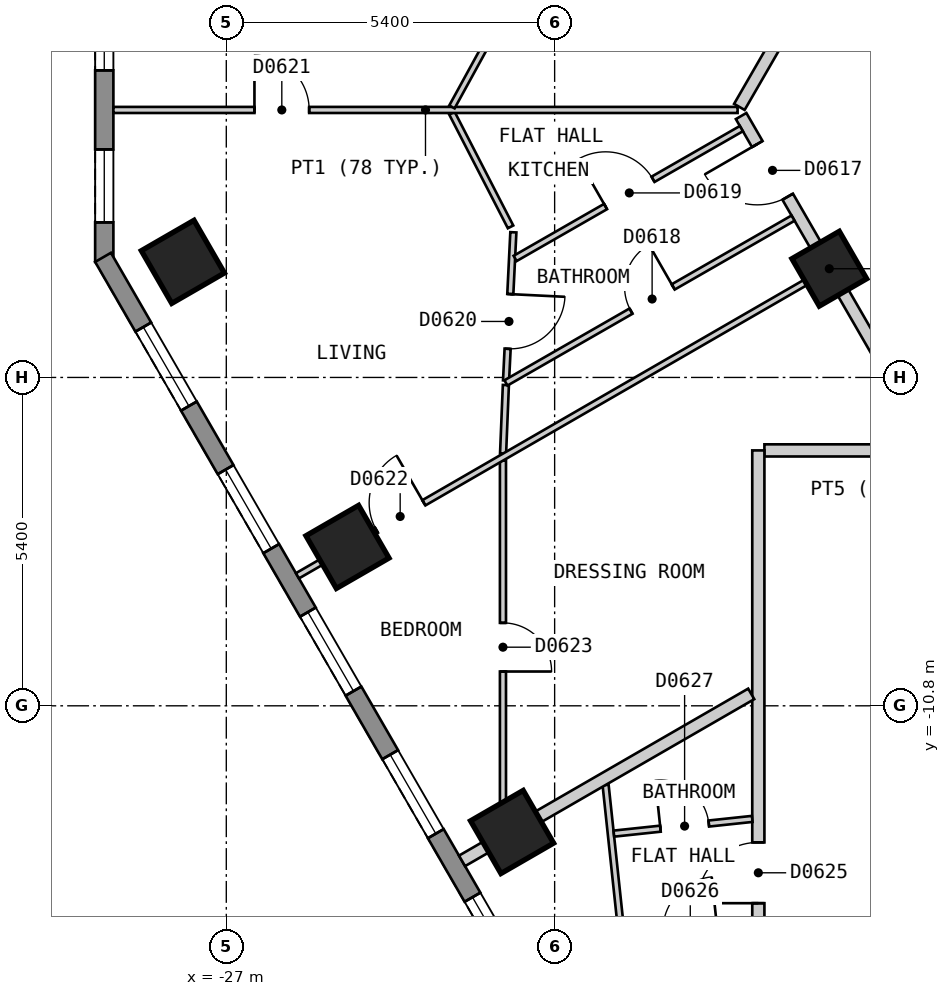
"""IFC4 building model, lengths in metres.
Left out: names, types, materials, properties, quantities, classifications, styles, units other than length and angle.
Written with IfcOpenShell. Run it as: python <this file> out.ifc"""

import sys

from ifc_helpers import new_model, si_unit, direction, frame, frame_2d, origin, origin_2d, place, context, subcontext, project, spatial, polyline, rectangle, outline, extrude, element, fill, save


model = new_model("IFC4")
c1 = context("Model", 3, precision=1e-05, world=origin(), true_north=direction((0.0, 1.0)))
c2 = subcontext(c1, "Body", "Model", "MODEL_VIEW")
j1 = project(units=[si_unit("LENGTHUNIT", "METRE"), si_unit("PLANEANGLEUNIT", "RADIAN")], contexts=[c1])
p1 = place(None, origin())
s1 = spatial("IfcSite", under=j1, at=p1, CompositionType="ELEMENT")
p2 = place(p1, origin())
s2 = spatial("IfcBuilding", under=s1, at=p2, CompositionType="ELEMENT")
p3 = place(p2, frame((0.0, 0.0, 81.0)))
s3 = spatial("IfcBuildingStorey", under=s2, at=p3, CompositionType="ELEMENT", Elevation=81.0)
for number, where, z_axis, x_axis in (
    (1, (-27.714, -3.499, 0.0), (0.0, 0.0, 1.0), (0.5, -0.866, 0.0)),
    (2, (-25.007, -8.187, 0.0), (0.0, 0.0, 1.0), (0.5, -0.866, 0.0)),
    (3, (-22.3, -12.875, 0.0), (0.0, 0.0, 1.0), (0.5, -0.866, 0.0)),
):
    element("IfcColumn", number, at=place(p3, frame(where, z_axis=z_axis, x_axis=x_axis)), inside=s3, PredefinedType="COLUMN", context=c2, shape_type="SweptSolid", body=[
        extrude(rectangle(XDim=1.0, YDim=1.0, at=origin_2d()), origin(), (0.0, 0.0, 1.0), 3.0),
    ])
p4 = place(p3, frame((-17.083, -3.612, 0.0), z_axis=(0.0, 0.0, 1.0), x_axis=(0.5, -0.866025403784, 0.0)))
e4 = element("IfcColumn", 4, at=p4, inside=s3, PredefinedType="COLUMN", context=c2, shape_type="SweptSolid", body=[
    extrude(rectangle(XDim=0.9, YDim=0.9, at=origin_2d()), origin(), (0.0, 0.0, 1.0), 3.0),
])
p5 = place(p3, frame((-29.007, 1.5, 0.0), z_axis=(0.0, 0.0, 1.0), x_axis=(0.0, -1.0, 0.0)))
e5 = element("IfcWall", 5, at=p5, inside=s3, PredefinedType="SOLIDWALL", context=c2, shape_type="SweptSolid", body=[
    extrude(outline(polyline([(0.0, -0.15), (5.0, -0.15), (4.92, 0.15), (0.08, 0.15), (0.0, -0.15)])), origin(), (0.0, 0.0, 1.0), 2.7),
])
p6 = place(p5, frame((0.65, 0.0, 0.15)))
e6 = element("IfcOpeningElement", 6, at=p6, cuts=e5, PredefinedType="OPENING", context=c2, shape_type="SweptSolid", body=[
    extrude(rectangle(XDim=1.2, YDim=2.1, at=frame_2d((0.6, 1.05))), frame((0.0, 0.16, 0.0), z_axis=(0.0, -1.0, 0.0), x_axis=(1.0, 0.0, 0.0)), (0.0, 0.0, 1.0), 0.32),
])
p7 = place(p5, frame((3.15, 0.0, 0.15)))
e7 = element("IfcOpeningElement", 7, at=p7, cuts=e5, PredefinedType="OPENING", context=c2, shape_type="SweptSolid", body=[
    extrude(rectangle(XDim=1.2, YDim=2.1, at=frame_2d((0.6, 1.05))), frame((0.0, 0.16, 0.0), z_axis=(0.0, -1.0, 0.0), x_axis=(1.0, 0.0, 0.0)), (0.0, 0.0, 1.0), 0.32),
])
p8 = place(p3, frame((-29.027, -3.425, 0.0), z_axis=(0.0, 0.0, 1.0), x_axis=(0.500035407905, -0.866004960056, 0.0)))
e8 = element("IfcWall", 8, at=p8, inside=s3, PredefinedType="SOLIDWALL", context=c2, shape_type="SweptSolid", body=[
    extrude(outline(polyline([(0.0, -0.15), (23.094, -0.15), (23.014, 0.15), (0.08, 0.15), (0.0, -0.15)])), origin(), (0.0, 0.0, 1.0), 2.7),
])
p9 = place(p8, frame((1.324, 0.0, 0.15)))
e9 = element("IfcOpeningElement", 9, at=p9, cuts=e8, PredefinedType="OPENING", context=c2, shape_type="SweptSolid", body=[
    extrude(rectangle(XDim=1.5, YDim=2.1, at=frame_2d((0.75, 1.05))), frame((0.0, 0.16, 0.0), z_axis=(0.0, -1.0, 0.0), x_axis=(1.0, 0.0, 0.0)), (0.0, 0.0, 1.0), 0.32),
])
p10 = place(p8, frame((4.031, 0.0, 0.15)))
e10 = element("IfcOpeningElement", 10, at=p10, cuts=e8, PredefinedType="OPENING", context=c2, shape_type="SweptSolid", body=[
    extrude(rectangle(XDim=1.5, YDim=2.1, at=frame_2d((0.75, 1.05))), frame((0.0, 0.16, 0.0), z_axis=(0.0, -1.0, 0.0), x_axis=(1.0, 0.0, 0.0)), (0.0, 0.0, 1.0), 0.32),
])
p11 = place(p8, frame((6.737, 0.0, 0.15)))
e11 = element("IfcOpeningElement", 11, at=p11, cuts=e8, PredefinedType="OPENING", context=c2, shape_type="SweptSolid", body=[
    extrude(rectangle(XDim=1.5, YDim=2.1, at=frame_2d((0.75, 1.05))), frame((0.0, 0.16, 0.0), z_axis=(0.0, -1.0, 0.0), x_axis=(1.0, 0.0, 0.0)), (0.0, 0.0, 1.0), 0.32),
])
p12 = place(p8, frame((9.444, 0.0, 0.15)))
e12 = element("IfcOpeningElement", 12, at=p12, cuts=e8, PredefinedType="OPENING", context=c2, shape_type="SweptSolid", body=[
    extrude(rectangle(XDim=1.5, YDim=2.1, at=frame_2d((0.75, 1.05))), frame((0.0, 0.16, 0.0), z_axis=(0.0, -1.0, 0.0), x_axis=(1.0, 0.0, 0.0)), (0.0, 0.0, 1.0), 0.32),
])
p13 = place(p8, frame((12.151, 0.0, 0.15)))
e13 = element("IfcOpeningElement", 13, at=p13, cuts=e8, PredefinedType="OPENING", context=c2, shape_type="SweptSolid", body=[
    extrude(rectangle(XDim=1.5, YDim=2.1, at=frame_2d((0.75, 1.05))), frame((0.0, 0.16, 0.0), z_axis=(0.0, -1.0, 0.0), x_axis=(1.0, 0.0, 0.0)), (0.0, 0.0, 1.0), 0.32),
])
p14 = place(p8, frame((14.857, 0.0, 0.15)))
e14 = element("IfcOpeningElement", 14, at=p14, cuts=e8, PredefinedType="OPENING", context=c2, shape_type="SweptSolid", body=[
    extrude(rectangle(XDim=1.5, YDim=2.1, at=frame_2d((0.75, 1.05))), frame((0.0, 0.16, 0.0), z_axis=(0.0, -1.0, 0.0), x_axis=(1.0, 0.0, 0.0)), (0.0, 0.0, 1.0), 0.32),
])
p15 = place(p8, frame((17.564, 0.0, 0.15)))
e15 = element("IfcOpeningElement", 15, at=p15, cuts=e8, PredefinedType="OPENING", context=c2, shape_type="SweptSolid", body=[
    extrude(rectangle(XDim=1.5, YDim=2.1, at=frame_2d((0.75, 1.05))), frame((0.0, 0.16, 0.0), z_axis=(0.0, -1.0, 0.0), x_axis=(1.0, 0.0, 0.0)), (0.0, 0.0, 1.0), 0.32),
])
p16 = place(p8, frame((20.27, 0.0, 0.15)))
e16 = element("IfcOpeningElement", 16, at=p16, cuts=e8, PredefinedType="OPENING", context=c2, shape_type="SweptSolid", body=[
    extrude(rectangle(XDim=1.5, YDim=2.1, at=frame_2d((0.75, 1.05))), frame((0.0, 0.16, 0.0), z_axis=(0.0, -1.0, 0.0), x_axis=(1.0, 0.0, 0.0)), (0.0, 0.0, 1.0), 0.32),
])
p17 = place(p3, frame((-18.533, -1.101, 0.0), z_axis=(0.0, 0.0, 1.0), x_axis=(0.500022085096, -0.866012652573, 0.0)))
e17 = element("IfcWall", 17, at=p17, inside=s3, PredefinedType="PARTITIONING", context=c2, shape_type="SweptSolid", body=[
    extrude(rectangle(XDim=6.066, YDim=0.2, at=frame_2d((3.033, 0.0))), origin(), (0.0, 0.0, 1.0), 2.7),
])
p18 = place(p17, frame((0.532, 0.0, 0.0)))
e18 = element("IfcOpeningElement", 18, at=p18, cuts=e17, PredefinedType="OPENING", context=c2, shape_type="SweptSolid", body=[
    extrude(rectangle(XDim=1.0, YDim=2.1, at=frame_2d((0.5, 1.05))), frame((0.0, 0.11, 0.0), z_axis=(0.0, -1.0, 0.0), x_axis=(1.0, 0.0, 0.0)), (0.0, 0.0, 1.0), 0.22),
])
p19 = place(p3, frame((-18.15, -6.6, 0.0), z_axis=(0.0, 0.0, 1.0), x_axis=(1.0, 0.0, 0.0)))
e19 = element("IfcWall", 19, at=p19, inside=s3, PredefinedType="PARTITIONING", context=c2, shape_type="SweptSolid", body=[
    extrude(rectangle(XDim=2.649, YDim=0.2, at=frame_2d((1.324, 0.0))), origin(), (0.0, 0.0, 1.0), 2.7),
])
p20 = place(p3, frame((-18.562, -0.951, 0.0), z_axis=(0.0, 0.0, 1.0), x_axis=(0.499992962407, 0.866029466902, 0.0)))
e20 = element("IfcWall", 20, at=p20, inside=s3, PredefinedType="PARTITIONING", context=c2, shape_type="SweptSolid", body=[
    extrude(rectangle(XDim=20.208, YDim=0.2, at=frame_2d((10.104, 0.0))), origin(), (0.0, 0.0, 1.0), 2.7),
])
p21 = place(p20, frame((9.604, 0.0, 0.0)))
e21 = element("IfcOpeningElement", 21, at=p21, cuts=e20, PredefinedType="OPENING", context=c2, shape_type="SweptSolid", body=[
    extrude(rectangle(XDim=1.0, YDim=2.1, at=frame_2d((0.5, 1.05))), frame((0.0, 0.11, 0.0), z_axis=(0.0, -1.0, 0.0), x_axis=(1.0, 0.0, 0.0)), (0.0, 0.0, 1.0), 0.22),
])
p22 = place(p3, frame((-18.25, -14.386, 0.0), z_axis=(0.0, 0.0, 1.0), x_axis=(0.0, 1.0, 0.0)))
e22 = element("IfcWall", 22, at=p22, inside=s3, PredefinedType="PARTITIONING", context=c2, shape_type="SweptSolid", body=[
    extrude(rectangle(XDim=7.786, YDim=0.2, at=frame_2d((3.893, 0.0))), origin(), (0.0, 0.0, 1.0), 2.7),
])
p23 = place(p22, frame((0.34, 0.0, 0.0)))
e23 = element("IfcOpeningElement", 23, at=p23, cuts=e22, PredefinedType="OPENING", context=c2, shape_type="SweptSolid", body=[
    extrude(rectangle(XDim=1.0, YDim=2.1, at=frame_2d((0.5, 1.05))), frame((0.0, 0.11, 0.0), z_axis=(0.0, -1.0, 0.0), x_axis=(1.0, 0.0, 0.0)), (0.0, 0.0, 1.0), 0.22),
])
p24 = place(p3, frame((-23.289, -1.054, 0.0), z_axis=(0.0, 0.0, 1.0), x_axis=(0.458226112305, -0.888835659726, 0.0)))
e24 = element("IfcWall", 24, at=p24, inside=s3, PredefinedType="PARTITIONING", context=c2, shape_type="SweptSolid", body=[
    extrude(rectangle(XDim=2.104, YDim=0.1, at=frame_2d((1.052, 0.0))), origin(), (0.0, 0.0, 1.0), 2.7),
])
p25 = place(p3, frame((-20.762, -12.102, 0.0), z_axis=(0.0, 0.0, 1.0), x_axis=(0.106118300401, -0.994353511745, 0.0)))
e25 = element("IfcWall", 25, at=p25, inside=s3, PredefinedType="PARTITIONING", context=c2, shape_type="SweptSolid", body=[
    extrude(rectangle(XDim=2.535, YDim=0.1, at=frame_2d((1.268, 0.0))), origin(), (0.0, 0.0, 1.0), 2.7),
])
p26 = place(p3, frame((-28.857, -1.001, 0.0), z_axis=(0.0, 0.0, 1.0), x_axis=(1.0, 0.0, 0.0)))
e26 = element("IfcWall", 26, at=p26, inside=s3, PredefinedType="PARTITIONING", context=c2, shape_type="SweptSolid", body=[
    extrude(rectangle(XDim=10.266, YDim=0.1, at=frame_2d((5.133, 0.0))), origin(), (0.0, 0.0, 1.0), 2.7),
])
p27 = place(p26, frame((2.32, 0.0, 0.0)))
e27 = element("IfcOpeningElement", 27, at=p27, cuts=e26, PredefinedType="OPENING", context=c2, shape_type="SweptSolid", body=[
    extrude(rectangle(XDim=0.9, YDim=2.1, at=frame_2d((0.45, 1.05))), frame((0.0, 0.06, 0.0), z_axis=(0.0, -1.0, 0.0), x_axis=(1.0, 0.0, 0.0)), (0.0, 0.0, 1.0), 0.12),
])
p28 = place(p3, frame((-20.626, -12.902, 0.0), z_axis=(0.0, 0.0, 1.0), x_axis=(0.994385570266, 0.105817473257, 0.0)))
e28 = element("IfcWall", 28, at=p28, inside=s3, PredefinedType="PARTITIONING", context=c2, shape_type="SweptSolid", body=[
    extrude(rectangle(XDim=2.289, YDim=0.1, at=frame_2d((1.145, 0.0))), origin(), (0.0, 0.0, 1.0), 2.7),
])
p29 = place(p28, frame((0.77, 0.0, 0.0)))
e29 = element("IfcOpeningElement", 29, at=p29, cuts=e28, PredefinedType="OPENING", context=c2, shape_type="SweptSolid", body=[
    extrude(rectangle(XDim=0.8, YDim=2.1, at=frame_2d((0.4, 1.05))), frame((0.0, 0.06, 0.0), z_axis=(0.0, -1.0, 0.0), x_axis=(1.0, 0.0, 0.0)), (0.0, 0.0, 1.0), 0.12),
])
p30 = place(p3, frame((-23.289, -0.951, 0.0), z_axis=(0.0, 0.0, 1.0), x_axis=(0.481164463081, 0.876630343684, 0.0)))
e30 = element("IfcWall", 30, at=p30, inside=s3, PredefinedType="PARTITIONING", context=c2, shape_type="SweptSolid", body=[
    extrude(rectangle(XDim=4.834, YDim=0.1, at=frame_2d((2.417, 0.0))), origin(), (0.0, 0.0, 1.0), 2.7),
])
p31 = place(p30, frame((2.039, 0.0, 0.0)))
e31 = element("IfcOpeningElement", 31, at=p31, cuts=e30, PredefinedType="OPENING", context=c2, shape_type="SweptSolid", body=[
    extrude(rectangle(XDim=0.8, YDim=2.1, at=frame_2d((0.4, 1.05))), frame((0.0, 0.06, 0.0), z_axis=(0.0, -1.0, 0.0), x_axis=(1.0, 0.0, 0.0)), (0.0, 0.0, 1.0), 0.12),
])
p32 = place(p3, frame((-22.399, -5.45, 0.0), z_axis=(0.0, 0.0, 1.0), x_axis=(0.049129140995, 0.998792434646, 0.0)))
e32 = element("IfcWall", 32, at=p32, inside=s3, PredefinedType="PARTITIONING", context=c2, shape_type="SweptSolid", body=[
    extrude(rectangle(XDim=2.44, YDim=0.1, at=frame_2d((1.22, 0.0))), origin(), (0.0, 0.0, 1.0), 2.7),
])
p33 = place(p32, frame((0.522, 0.0, 0.0)))
e33 = element("IfcOpeningElement", 33, at=p33, cuts=e32, PredefinedType="OPENING", context=c2, shape_type="SweptSolid", body=[
    extrude(rectangle(XDim=0.9, YDim=2.1, at=frame_2d((0.45, 1.05))), frame((0.0, 0.06, 0.0), z_axis=(0.0, -1.0, 0.0), x_axis=(1.0, 0.0, 0.0)), (0.0, 0.0, 1.0), 0.12),
])
p34 = place(p3, frame((-22.448, -6.651, 0.0), z_axis=(0.0, 0.0, 1.0), x_axis=(0.040729401597, 0.99917021365, 0.0)))
e34 = element("IfcWall", 34, at=p34, inside=s3, PredefinedType="PARTITIONING", context=c2, shape_type="SweptSolid", body=[
    extrude(rectangle(XDim=1.127, YDim=0.1, at=frame_2d((0.563, 0.0))), origin(), (0.0, 0.0, 1.0), 2.7),
])
p35 = place(p3, frame((-22.45, -12.846, 0.0), z_axis=(0.0, 0.0, 1.0), x_axis=(0.0, 1.0, 0.0)))
e35 = element("IfcWall", 35, at=p35, inside=s3, PredefinedType="PARTITIONING", context=c2, shape_type="SweptSolid", body=[
    extrude(rectangle(XDim=6.078, YDim=0.1, at=frame_2d((3.039, 0.0))), origin(), (0.0, 0.0, 1.0), 2.7),
])
p36 = place(p35, frame((2.61, 0.0, 0.0)))
e36 = element("IfcOpeningElement", 36, at=p36, cuts=e35, PredefinedType="OPENING", context=c2, shape_type="SweptSolid", body=[
    extrude(rectangle(XDim=0.8, YDim=2.1, at=frame_2d((0.4, 1.05))), frame((0.0, 0.06, 0.0), z_axis=(0.0, -1.0, 0.0), x_axis=(1.0, 0.0, 0.0)), (0.0, 0.0, 1.0), 0.12),
])
p37 = place(p3, frame((-25.83, -8.662, 0.0), z_axis=(0.0, 0.0, 1.0), x_axis=(0.866022959057, 0.500004234368, 0.0)))
e37 = element("IfcWall", 37, at=p37, inside=s3, PredefinedType="PARTITIONING", context=c2, shape_type="SweptSolid", body=[
    extrude(rectangle(XDim=10.0, YDim=0.1, at=frame_2d((5.0, 0.0))), origin(), (0.0, 0.0, 1.0), 2.7),
])
p38 = place(p37, frame((1.501, 0.0, 0.0)))
e38 = element("IfcOpeningElement", 38, at=p38, cuts=e37, PredefinedType="OPENING", context=c2, shape_type="SweptSolid", body=[
    extrude(rectangle(XDim=0.9, YDim=2.1, at=frame_2d((0.45, 1.05))), frame((0.0, 0.06, 0.0), z_axis=(0.0, -1.0, 0.0), x_axis=(1.0, 0.0, 0.0)), (0.0, 0.0, 1.0), 0.12),
])
p39 = place(p3, frame((-22.401, -5.49, 0.0), z_axis=(0.0, 0.0, 1.0), x_axis=(0.867314404256, 0.497760709749, 0.0)))
e39 = element("IfcWall", 39, at=p39, inside=s3, PredefinedType="PARTITIONING", context=c2, shape_type="SweptSolid", body=[
    extrude(rectangle(XDim=5.444, YDim=0.1, at=frame_2d((2.722, 0.0))), origin(), (0.0, 0.0, 1.0), 2.7),
])
p40 = place(p39, frame((2.372, 0.0, 0.0)))
e40 = element("IfcOpeningElement", 40, at=p40, cuts=e39, PredefinedType="OPENING", context=c2, shape_type="SweptSolid", body=[
    extrude(rectangle(XDim=0.8, YDim=2.1, at=frame_2d((0.4, 1.05))), frame((0.0, 0.06, 0.0), z_axis=(0.0, -1.0, 0.0), x_axis=(1.0, 0.0, 0.0)), (0.0, 0.0, 1.0), 0.12),
])
p41 = place(p3, frame((-22.25, -3.443, 0.0), z_axis=(0.0, 0.0, 1.0), x_axis=(0.867362741349, 0.497676476156, 0.0)))
e41 = element("IfcWall", 41, at=p41, inside=s3, PredefinedType="PARTITIONING", context=c2, shape_type="SweptSolid", body=[
    extrude(rectangle(XDim=4.29, YDim=0.1, at=frame_2d((2.145, 0.0))), origin(), (0.0, 0.0, 1.0), 2.7),
])
p42 = place(p41, frame((1.715, 0.0, 0.0)))
e42 = element("IfcOpeningElement", 42, at=p42, cuts=e41, PredefinedType="OPENING", context=c2, shape_type="SweptSolid", body=[
    extrude(rectangle(XDim=0.9, YDim=2.1, at=frame_2d((0.45, 1.05))), frame((0.0, 0.06, 0.0), z_axis=(0.0, -1.0, 0.0), x_axis=(1.0, 0.0, 0.0)), (0.0, 0.0, 1.0), 0.12),
])
p43 = place(p3, frame((-23.123, -13.35, 0.0), z_axis=(0.0, 0.0, 1.0), x_axis=(0.866013095437, 0.500021318078, 0.0)))
e43 = element("IfcWall", 43, at=p43, inside=s3, PredefinedType="PARTITIONING", context=c2, shape_type="SweptSolid", body=[
    extrude(rectangle(XDim=5.492, YDim=0.2, at=frame_2d((2.746, 0.0))), origin(), (0.0, 0.0, 1.0), 2.7),
])
p44 = place(p6, origin())
e44 = element("IfcWindow", 44, at=p44, inside=s3, PartitioningType="SINGLE_PANEL", PredefinedType="WINDOW", context=c2, shape_type="SweptSolid", body=[
    extrude(rectangle(XDim=1.2, YDim=2.1, at=frame_2d((0.6, 1.05))), frame((0.0, 0.03, 0.0), z_axis=(0.0, -1.0, 0.0), x_axis=(1.0, 0.0, 0.0)), (0.0, 0.0, 1.0), 0.06),
])
fill(e6, e44)
p45 = place(p7, origin())
e45 = element("IfcWindow", 45, at=p45, inside=s3, PartitioningType="SINGLE_PANEL", PredefinedType="WINDOW", context=c2, shape_type="SweptSolid", body=[
    extrude(rectangle(XDim=1.2, YDim=2.1, at=frame_2d((0.6, 1.05))), frame((0.0, 0.03, 0.0), z_axis=(0.0, -1.0, 0.0), x_axis=(1.0, 0.0, 0.0)), (0.0, 0.0, 1.0), 0.06),
])
fill(e7, e45)
p46 = place(p9, origin())
e46 = element("IfcWindow", 46, at=p46, inside=s3, PartitioningType="SINGLE_PANEL", PredefinedType="WINDOW", context=c2, shape_type="SweptSolid", body=[
    extrude(rectangle(XDim=1.5, YDim=2.1, at=frame_2d((0.75, 1.05))), frame((0.0, 0.03, 0.0), z_axis=(0.0, -1.0, 0.0), x_axis=(1.0, 0.0, 0.0)), (0.0, 0.0, 1.0), 0.06),
])
fill(e9, e46)
p47 = place(p10, origin())
e47 = element("IfcWindow", 47, at=p47, inside=s3, PartitioningType="SINGLE_PANEL", PredefinedType="WINDOW", context=c2, shape_type="SweptSolid", body=[
    extrude(rectangle(XDim=1.5, YDim=2.1, at=frame_2d((0.75, 1.05))), frame((0.0, 0.03, 0.0), z_axis=(0.0, -1.0, 0.0), x_axis=(1.0, 0.0, 0.0)), (0.0, 0.0, 1.0), 0.06),
])
fill(e10, e47)
p48 = place(p11, origin())
e48 = element("IfcWindow", 48, at=p48, inside=s3, PartitioningType="SINGLE_PANEL", PredefinedType="WINDOW", context=c2, shape_type="SweptSolid", body=[
    extrude(rectangle(XDim=1.5, YDim=2.1, at=frame_2d((0.75, 1.05))), frame((0.0, 0.03, 0.0), z_axis=(0.0, -1.0, 0.0), x_axis=(1.0, 0.0, 0.0)), (0.0, 0.0, 1.0), 0.06),
])
fill(e11, e48)
p49 = place(p12, origin())
e49 = element("IfcWindow", 49, at=p49, inside=s3, PartitioningType="SINGLE_PANEL", PredefinedType="WINDOW", context=c2, shape_type="SweptSolid", body=[
    extrude(rectangle(XDim=1.5, YDim=2.1, at=frame_2d((0.75, 1.05))), frame((0.0, 0.03, 0.0), z_axis=(0.0, -1.0, 0.0), x_axis=(1.0, 0.0, 0.0)), (0.0, 0.0, 1.0), 0.06),
])
fill(e12, e49)
p50 = place(p13, origin())
e50 = element("IfcWindow", 50, at=p50, inside=s3, PartitioningType="SINGLE_PANEL", PredefinedType="WINDOW", context=c2, shape_type="SweptSolid", body=[
    extrude(rectangle(XDim=1.5, YDim=2.1, at=frame_2d((0.75, 1.05))), frame((0.0, 0.03, 0.0), z_axis=(0.0, -1.0, 0.0), x_axis=(1.0, 0.0, 0.0)), (0.0, 0.0, 1.0), 0.06),
])
fill(e13, e50)
p51 = place(p18, origin())
e51 = element("IfcDoor", 51, at=p51, inside=s3, OperationType="SINGLE_SWING_LEFT", PredefinedType="DOOR", context=c2, shape_type="SweptSolid", body=[
    extrude(rectangle(XDim=1.0, YDim=2.1, at=frame_2d((0.5, 1.05))), frame((0.0, 0.025, 0.0), z_axis=(0.0, -1.0, 0.0), x_axis=(1.0, 0.0, 0.0)), (0.0, 0.0, 1.0), 0.05),
])
fill(e18, e51)
p52 = place(p40, origin())
e52 = element("IfcDoor", 52, at=p52, inside=s3, OperationType="SINGLE_SWING_RIGHT", PredefinedType="DOOR", context=c2, shape_type="SweptSolid", body=[
    extrude(rectangle(XDim=0.8, YDim=2.1, at=frame_2d((0.4, 1.05))), frame((0.0, 0.025, 0.0), z_axis=(0.0, -1.0, 0.0), x_axis=(1.0, 0.0, 0.0)), (0.0, 0.0, 1.0), 0.05),
])
fill(e40, e52)
p53 = place(p42, origin())
e53 = element("IfcDoor", 53, at=p53, inside=s3, OperationType="SINGLE_SWING_LEFT", PredefinedType="DOOR", context=c2, shape_type="SweptSolid", body=[
    extrude(rectangle(XDim=0.9, YDim=2.1, at=frame_2d((0.45, 1.05))), frame((0.0, 0.025, 0.0), z_axis=(0.0, -1.0, 0.0), x_axis=(1.0, 0.0, 0.0)), (0.0, 0.0, 1.0), 0.05),
])
fill(e42, e53)
p54 = place(p33, origin())
e54 = element("IfcDoor", 54, at=p54, inside=s3, OperationType="SINGLE_SWING_RIGHT", PredefinedType="DOOR", context=c2, shape_type="SweptSolid", body=[
    extrude(rectangle(XDim=0.9, YDim=2.1, at=frame_2d((0.45, 1.05))), frame((0.0, 0.025, 0.0), z_axis=(0.0, -1.0, 0.0), x_axis=(1.0, 0.0, 0.0)), (0.0, 0.0, 1.0), 0.05),
])
fill(e33, e54)
p55 = place(p27, origin())
e55 = element("IfcDoor", 55, at=p55, inside=s3, OperationType="SINGLE_SWING_LEFT", PredefinedType="DOOR", context=c2, shape_type="SweptSolid", body=[
    extrude(rectangle(XDim=0.9, YDim=2.1, at=frame_2d((0.45, 1.05))), frame((0.0, 0.025, 0.0), z_axis=(0.0, -1.0, 0.0), x_axis=(1.0, 0.0, 0.0)), (0.0, 0.0, 1.0), 0.05),
])
fill(e27, e55)
p56 = place(p38, origin())
e56 = element("IfcDoor", 56, at=p56, inside=s3, OperationType="SINGLE_SWING_RIGHT", PredefinedType="DOOR", context=c2, shape_type="SweptSolid", body=[
    extrude(rectangle(XDim=0.9, YDim=2.1, at=frame_2d((0.45, 1.05))), frame((0.0, 0.025, 0.0), z_axis=(0.0, -1.0, 0.0), x_axis=(1.0, 0.0, 0.0)), (0.0, 0.0, 1.0), 0.05),
])
fill(e38, e56)
p57 = place(p36, origin())
e57 = element("IfcDoor", 57, at=p57, inside=s3, OperationType="SINGLE_SWING_LEFT", PredefinedType="DOOR", context=c2, shape_type="SweptSolid", body=[
    extrude(rectangle(XDim=0.8, YDim=2.1, at=frame_2d((0.4, 1.05))), frame((0.0, 0.025, 0.0), z_axis=(0.0, -1.0, 0.0), x_axis=(1.0, 0.0, 0.0)), (0.0, 0.0, 1.0), 0.05),
])
fill(e36, e57)
p58 = place(p23, origin())
e58 = element("IfcDoor", 58, at=p58, inside=s3, OperationType="SINGLE_SWING_LEFT", PredefinedType="DOOR", context=c2, shape_type="SweptSolid", body=[
    extrude(rectangle(XDim=1.0, YDim=2.1, at=frame_2d((0.5, 1.05))), frame((0.0, 0.025, 0.0), z_axis=(0.0, -1.0, 0.0), x_axis=(1.0, 0.0, 0.0)), (0.0, 0.0, 1.0), 0.05),
])
fill(e23, e58)
p59 = place(p29, origin())
e59 = element("IfcDoor", 59, at=p59, inside=s3, OperationType="SINGLE_SWING_LEFT", PredefinedType="DOOR", context=c2, shape_type="SweptSolid", body=[
    extrude(rectangle(XDim=0.8, YDim=2.1, at=frame_2d((0.4, 1.05))), frame((0.0, 0.025, 0.0), z_axis=(0.0, -1.0, 0.0), x_axis=(1.0, 0.0, 0.0)), (0.0, 0.0, 1.0), 0.05),
])
fill(e29, e59)
save(model, sys.argv[1])
